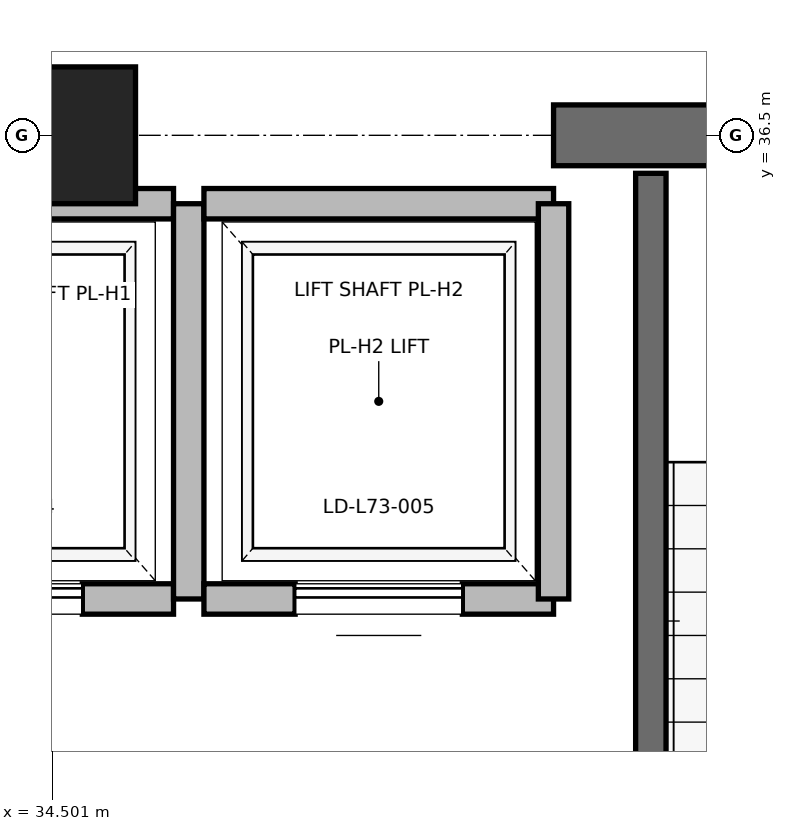
"""IFC4 building model, lengths in metres.
Left out: names, types, materials, properties, quantities, classifications, styles, units other than length and angle.
Written with IfcOpenShell. Run it as: python <this file> out.ifc"""

import sys

from ifc_helpers import new_model, si_unit, direction, frame, frame_2d, origin, origin_2d, place, context, subcontext, project, spatial, rectangle, extrude, element, fill, save


model = new_model("IFC4")
c1 = context("Model", 3, precision=1e-05, world=origin(), true_north=direction((0.0, 1.0)))
c2 = subcontext(c1, "Body", "Model", "MODEL_VIEW")
j1 = project(units=[si_unit("LENGTHUNIT", "METRE"), si_unit("PLANEANGLEUNIT", "RADIAN")], contexts=[c1])
p1 = place(None, origin())
s1 = spatial("IfcSite", under=j1, at=p1, CompositionType="ELEMENT")
p2 = place(p1, origin())
s2 = spatial("IfcBuilding", under=s1, at=p2, CompositionType="ELEMENT")
p3 = place(p2, frame((0.0, 0.0, 314.8)))
s3 = spatial("IfcBuildingStorey", under=s2, at=p3, CompositionType="ELEMENT", Elevation=314.8)
p4 = place(p3, frame((34.6, 36.5, 0.0), z_axis=(0.0, 0.0, 1.0), x_axis=(1.0, 0.0, 0.0)))
e1 = element("IfcColumn", 1, at=p4, inside=s3, PredefinedType="PILASTER", context=c2, shape_type="SweptSolid", body=[
    extrude(rectangle(XDim=0.9, YDim=0.9, at=origin_2d()), origin(), (0.0, 0.0, 1.0), 4.0),
])
p5 = place(p3, frame((29.0, 36.5, 0.0), z_axis=(0.0, 0.0, 1.0), x_axis=(1.0, 0.0, 0.0)))
e2 = element("IfcWall", 2, at=p5, inside=s3, PredefinedType="SHEAR", context=c2, shape_type="SweptSolid", body=[
    extrude(rectangle(XDim=5.8, YDim=0.4, at=frame_2d((2.9, 0.0))), origin(), (0.0, 0.0, 1.0), 3.785),
])
p6 = place(p3, frame((37.8, 36.5, 0.0), z_axis=(0.0, 0.0, 1.0), x_axis=(1.0, 0.0, 0.0)))
e3 = element("IfcWall", 3, at=p6, inside=s3, PredefinedType="SHEAR", context=c2, shape_type="SweptSolid", body=[
    extrude(rectangle(XDim=4.4, YDim=0.4, at=frame_2d((2.2, 0.0))), origin(), (0.0, 0.0, 1.0), 3.785),
])
p7 = place(p6, frame((1.65, 0.0, 0.0)))
e4 = element("IfcOpeningElement", 4, at=p7, cuts=e3, PredefinedType="OPENING", context=c2, shape_type="SweptSolid", body=[
    extrude(rectangle(XDim=1.1, YDim=2.15, at=frame_2d((0.55, 1.075))), frame((0.0, 0.2, 0.0), z_axis=(0.0, -1.0, 0.0), x_axis=(1.0, 0.0, 0.0)), (0.0, 0.0, 1.0), 0.4),
])
p8 = place(p3, frame((38.44, 27.38, 0.0), z_axis=(0.0, 0.0, 1.0), x_axis=(0.0, 1.0, 0.0)))
e5 = element("IfcWall", 5, at=p8, inside=s3, PredefinedType="SOLIDWALL", context=c2, shape_type="SweptSolid", body=[
    extrude(rectangle(XDim=8.87, YDim=0.2, at=frame_2d((4.435, 0.0))), origin(), (0.0, 0.0, 1.0), 3.785),
])
p9 = place(p3, frame((33.0, 33.45, 0.0), z_axis=(0.0, 0.0, 1.0), x_axis=(1.0, 0.0, 0.0)))
e6 = element("IfcWall", 6, at=p9, inside=s3, PredefinedType="SOLIDWALL", context=c2, shape_type="SweptSolid", body=[
    extrude(rectangle(XDim=2.3, YDim=0.2, at=frame_2d((1.15, 0.0))), origin(), (0.0, 0.0, 1.0), 3.785),
])
p10 = place(p9, frame((0.6, 0.0, 0.0)))
e7 = element("IfcOpeningElement", 7, at=p10, cuts=e6, PredefinedType="OPENING", context=c2, shape_type="SweptSolid", body=[
    extrude(rectangle(XDim=1.1, YDim=2.2, at=frame_2d((0.55, 1.1))), frame((0.0, 0.1, 0.0), z_axis=(0.0, -1.0, 0.0), x_axis=(1.0, 0.0, 0.0)), (0.0, 0.0, 1.0), 0.2),
])
p11 = place(p3, frame((35.3, 36.05, 0.0), z_axis=(0.0, 0.0, 1.0), x_axis=(-1.0, 0.0, 0.0)))
e8 = element("IfcWall", 8, at=p11, inside=s3, PredefinedType="SOLIDWALL", context=c2, shape_type="SweptSolid", body=[
    extrude(rectangle(XDim=2.3, YDim=0.2, at=frame_2d((1.15, 0.0))), origin(), (0.0, 0.0, 1.0), 2.865),
])
p12 = place(p3, frame((35.4, 33.45, 0.0), z_axis=(0.0, 0.0, 1.0), x_axis=(0.0, 1.0, 0.0)))
e9 = element("IfcWall", 9, at=p12, inside=s3, PredefinedType="SOLIDWALL", context=c2, shape_type="SweptSolid", body=[
    extrude(rectangle(XDim=2.6, YDim=0.2, at=frame_2d((1.3, 0.0))), origin(), (0.0, 0.0, 1.0), 2.865),
])
p13 = place(p3, frame((35.5, 33.45, 0.0), z_axis=(0.0, 0.0, 1.0), x_axis=(1.0, 0.0, 0.0)))
e10 = element("IfcWall", 10, at=p13, inside=s3, PredefinedType="SOLIDWALL", context=c2, shape_type="SweptSolid", body=[
    extrude(rectangle(XDim=2.3, YDim=0.2, at=frame_2d((1.15, 0.0))), origin(), (0.0, 0.0, 1.0), 3.785),
])
p14 = place(p13, frame((0.6, 0.0, 0.0)))
e11 = element("IfcOpeningElement", 11, at=p14, cuts=e10, PredefinedType="OPENING", context=c2, shape_type="SweptSolid", body=[
    extrude(rectangle(XDim=1.1, YDim=2.2, at=frame_2d((0.55, 1.1))), frame((0.0, 0.1, 0.0), z_axis=(0.0, -1.0, 0.0), x_axis=(1.0, 0.0, 0.0)), (0.0, 0.0, 1.0), 0.2),
])
p15 = place(p3, frame((37.8, 36.05, 0.0), z_axis=(0.0, 0.0, 1.0), x_axis=(-1.0, 0.0, 0.0)))
e12 = element("IfcWall", 12, at=p15, inside=s3, PredefinedType="SOLIDWALL", context=c2, shape_type="SweptSolid", body=[
    extrude(rectangle(XDim=2.3, YDim=0.2, at=frame_2d((1.15, 0.0))), origin(), (0.0, 0.0, 1.0), 2.865),
])
p16 = place(p3, frame((37.8, 33.45, 0.0), z_axis=(0.0, 0.0, 1.0), x_axis=(0.0, 1.0, 0.0)))
e13 = element("IfcWall", 13, at=p16, inside=s3, PredefinedType="SOLIDWALL", context=c2, shape_type="SweptSolid", body=[
    extrude(rectangle(XDim=2.6, YDim=0.2, at=frame_2d((1.3, 0.0))), origin(), (0.0, 0.0, 1.0), 2.865),
])
p17 = place(p10, origin())
e14 = element("IfcDoor", 14, at=p17, inside=s3, OperationType="SLIDING_TO_RIGHT", PredefinedType="DOOR", context=c2, shape_type="SweptSolid", body=[
    extrude(rectangle(XDim=1.1, YDim=2.2, at=frame_2d((0.55, 1.1))), frame((0.0, 0.025, 0.0), z_axis=(0.0, -1.0, 0.0), x_axis=(1.0, 0.0, 0.0)), (0.0, 0.0, 1.0), 0.05),
])
fill(e7, e14)
p18 = place(p14, origin())
e15 = element("IfcDoor", 15, at=p18, inside=s3, OperationType="SLIDING_TO_RIGHT", PredefinedType="DOOR", context=c2, shape_type="SweptSolid", body=[
    extrude(rectangle(XDim=1.1, YDim=2.2, at=frame_2d((0.55, 1.1))), frame((0.0, 0.025, 0.0), z_axis=(0.0, -1.0, 0.0), x_axis=(1.0, 0.0, 0.0)), (0.0, 0.0, 1.0), 0.05),
])
fill(e11, e15)
save(model, sys.argv[1])
